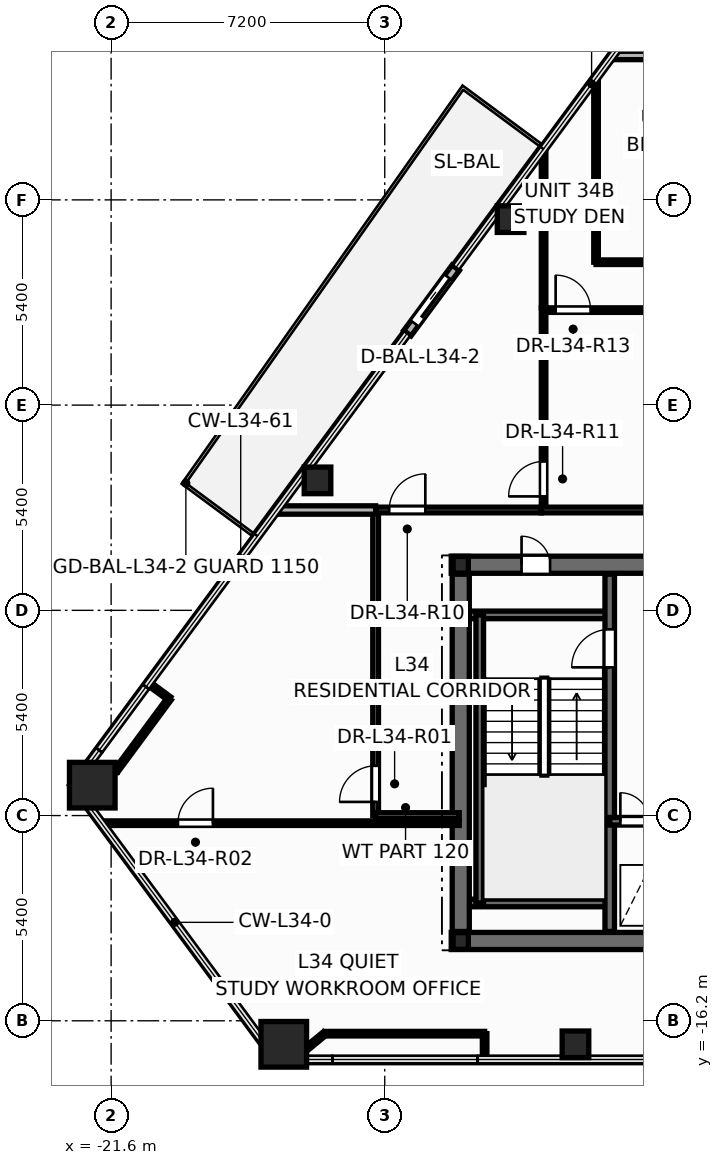
"""IFC4 building model, lengths in metres.
Left out: names, types, materials, properties, quantities, classifications, styles, units other than length and angle.
Written with IfcOpenShell. Run it as: python <this file> out.ifc"""

import sys

from ifc_helpers import new_model, si_unit, direction, frame, frame_2d, origin, origin_2d, place, context, subcontext, project, spatial, rectangle, hollow_rectangle, hollow_circle, i_section, extrude, element, fill, save


model = new_model("IFC4")
c1 = context("Model", 3, precision=1e-05, world=origin(), true_north=direction((0.0, 1.0)))
c2 = subcontext(c1, "Body", "Model", "MODEL_VIEW")
j1 = project(units=[si_unit("LENGTHUNIT", "METRE"), si_unit("PLANEANGLEUNIT", "RADIAN")], contexts=[c1])
p1 = place(None, origin())
s1 = spatial("IfcSite", under=j1, at=p1, CompositionType="ELEMENT")
p2 = place(p1, origin())
s2 = spatial("IfcBuilding", under=s1, at=p2, CompositionType="ELEMENT")
p3 = place(p2, frame((0.0, 0.0, 132.9)))
s3 = spatial("IfcBuildingStorey", under=s2, at=p3, CompositionType="ELEMENT", Elevation=132.9)
for number, where, z_axis, x_axis in (
    (1, (-22.096, -10.0, 0.0), (0.0, 0.0, 1.0), (1.0, 0.0, 0.0)),
    (2, (-17.057, -16.819, 0.0), (0.0, 0.0, 1.0), (1.0, 0.0, 0.0)),
):
    element("IfcColumn", number, at=place(p3, frame(where, z_axis=z_axis, x_axis=x_axis)), inside=s3, PredefinedType="COLUMN", context=c2, shape_type="SweptSolid", body=[
        extrude(hollow_rectangle(XDim=1.2, YDim=1.2, WallThickness=0.055, at=origin_2d()), origin(), (0.0, 0.0, 1.0), 3.6),
    ])
for number, where, z_axis, x_axis in (
    (3, (-9.381, -16.819, 0.0), (0.0, 0.0, 1.0), (1.0, 0.0, 0.0)),
    (4, (-11.089, 4.894, 0.0), (0.0, 0.0, 1.0), (1.0, 0.0, 0.0)),
    (5, (-16.169, -1.98, 0.0), (0.0, 0.0, 1.0), (1.0, 0.0, 0.0)),
):
    element("IfcColumn", number, at=place(p3, frame(where, z_axis=z_axis, x_axis=x_axis)), inside=s3, PredefinedType="COLUMN", context=c2, shape_type="SweptSolid", body=[
        extrude(hollow_circle(Radius=0.35, WallThickness=0.03, at=origin_2d()), origin(), (0.0, 0.0, 1.0), 3.6),
    ])
for number, where, z_axis, x_axis in (
    (6, (-12.4, -14.1, 0.0), (0.0, 0.0, 1.0), (1.0, 0.0, 0.0)),
    (7, (-12.4, -4.2, 0.0), (0.0, 0.0, 1.0), (1.0, 0.0, 0.0)),
):
    element("IfcColumn", number, at=place(p3, frame(where, z_axis=z_axis, x_axis=x_axis)), inside=s3, PredefinedType="COLUMN", context=c2, shape_type="SweptSolid", body=[
        extrude(i_section(OverallWidth=0.4, OverallDepth=0.44, WebThickness=0.028, FlangeThickness=0.04, at=origin_2d()), origin(), (0.0, 0.0, 1.0), 3.6),
    ])
p4 = place(p3, frame((-12.532, 3.614, -0.015), z_axis=(0.0, 0.0, 1.0), x_axis=(-0.594381437757, -0.804183254271, 0.0)))
e8 = element("IfcWall", 8, at=p4, inside=s3, PredefinedType="STANDARD", context=c2, shape_type="SweptSolid", body=[
    extrude(rectangle(XDim=2.14, YDim=0.24, at=frame_2d((1.07, 0.0))), origin(), (0.0, 0.0, 1.0), 2.807),
])
p5 = place(p4, frame((0.32, 0.0, 0.015)))
e9 = element("IfcOpeningElement", 9, at=p5, cuts=e8, PredefinedType="OPENING", context=c2, shape_type="SweptSolid", body=[
    extrude(rectangle(XDim=1.506, YDim=2.204, at=frame_2d((0.75, 1.102))), frame((0.0, 0.13, 0.0), z_axis=(0.0, -1.0, 0.0), x_axis=(1.0, 0.0, 0.0)), (0.0, 0.0, 1.0), 0.26),
])
p6 = place(p3, frame((-12.65, -14.1, 0.0), z_axis=(0.0, 0.0, 1.0), x_axis=(1.0, 0.0, 0.0)))
e10 = element("IfcWall", 10, at=p6, inside=s3, PredefinedType="SHEAR", context=c2, shape_type="SweptSolid", body=[
    extrude(rectangle(XDim=25.3, YDim=0.45, at=frame_2d((12.65, 0.0))), origin(), (0.0, 0.0, 1.0), 3.6),
])
p7 = place(p3, frame((-12.65, -4.2, 0.0), z_axis=(0.0, 0.0, 1.0), x_axis=(1.0, 0.0, 0.0)))
e11 = element("IfcWall", 11, at=p7, inside=s3, PredefinedType="SHEAR", context=c2, shape_type="SweptSolid", body=[
    extrude(rectangle(XDim=25.3, YDim=0.45, at=frame_2d((12.65, 0.0))), origin(), (0.0, 0.0, 1.0), 3.6),
])
p8 = place(p7, frame((1.85, 0.0, 0.0)))
e12 = element("IfcOpeningElement", 12, at=p8, cuts=e11, PredefinedType="OPENING", context=c2, shape_type="SweptSolid", body=[
    extrude(rectangle(XDim=0.756, YDim=2.054, at=frame_2d((0.375, 1.027))), frame((0.0, 0.235, 0.0), z_axis=(0.0, -1.0, 0.0), x_axis=(1.0, 0.0, 0.0)), (0.0, 0.0, 1.0), 0.47),
])
p9 = place(p7, frame((21.85, 0.0, 0.0)))
e13 = element("IfcOpeningElement", 13, at=p9, cuts=e11, PredefinedType="OPENING", context=c2, shape_type="SweptSolid", body=[
    extrude(rectangle(XDim=0.756, YDim=2.054, at=frame_2d((0.375, 1.027))), frame((0.0, 0.235, 0.0), z_axis=(0.0, -1.0, 0.0), x_axis=(1.0, 0.0, 0.0)), (0.0, 0.0, 1.0), 0.47),
])
p10 = place(p7, frame((23.5, 0.0, 0.0)))
e14 = element("IfcOpeningElement", 14, at=p10, cuts=e11, PredefinedType="OPENING", context=c2, shape_type="SweptSolid", body=[
    extrude(rectangle(XDim=0.756, YDim=2.054, at=frame_2d((0.375, 1.027))), frame((0.0, 0.235, 0.0), z_axis=(0.0, -1.0, 0.0), x_axis=(1.0, 0.0, 0.0)), (0.0, 0.0, 1.0), 0.47),
])
p11 = place(p7, frame((5.85, 0.0, 0.0)))
e15 = element("IfcOpeningElement", 15, at=p11, cuts=e11, PredefinedType="OPENING", context=c2, shape_type="SweptSolid", body=[
    extrude(rectangle(XDim=1.006, YDim=2.104, at=frame_2d((0.5, 1.052))), frame((0.0, 0.235, 0.0), z_axis=(0.0, -1.0, 0.0), x_axis=(1.0, 0.0, 0.0)), (0.0, 0.0, 1.0), 0.47),
])
p12 = place(p7, frame((10.35, 0.0, 0.0)))
e16 = element("IfcOpeningElement", 16, at=p12, cuts=e11, PredefinedType="OPENING", context=c2, shape_type="SweptSolid", body=[
    extrude(rectangle(XDim=1.406, YDim=2.154, at=frame_2d((0.7, 1.077))), frame((0.0, 0.235, 0.0), z_axis=(0.0, -1.0, 0.0), x_axis=(1.0, 0.0, 0.0)), (0.0, 0.0, 1.0), 0.47),
])
p13 = place(p7, frame((18.45, 0.0, 0.0)))
e17 = element("IfcOpeningElement", 17, at=p13, cuts=e11, PredefinedType="OPENING", context=c2, shape_type="SweptSolid", body=[
    extrude(rectangle(XDim=1.006, YDim=2.104, at=frame_2d((0.5, 1.052))), frame((0.0, 0.235, 0.0), z_axis=(0.0, -1.0, 0.0), x_axis=(1.0, 0.0, 0.0)), (0.0, 0.0, 1.0), 0.47),
])
for number, where, z_axis, x_axis in (
    (18, (-12.35, -5.52, 0.0), (0.0, 0.0, 1.0), (1.0, 0.0, 0.0)),
    (19, (-12.35, -13.1, 0.0), (0.0, 0.0, 1.0), (1.0, 0.0, 0.0)),
):
    element("IfcWall", number, at=place(p3, frame(where, z_axis=z_axis, x_axis=x_axis)), inside=s3, PredefinedType="SOLIDWALL", context=c2, shape_type="SweptSolid", body=[
        extrude(rectangle(XDim=3.87, YDim=0.2, at=frame_2d((1.935, 0.0))), origin(), (0.0, 0.0, 1.0), 3.6),
    ])
p14 = place(p3, frame((-11.9, -13.1, 0.0), z_axis=(0.0, 0.0, 1.0), x_axis=(0.0, 1.0, 0.0)))
e20 = element("IfcWall", 20, at=p14, inside=s3, PredefinedType="SOLIDWALL", context=c2, shape_type="SweptSolid", body=[
    extrude(rectangle(XDim=7.58, YDim=0.2, at=frame_2d((3.79, 0.0))), origin(), (0.0, 0.0, 1.0), 3.6),
])
p15 = place(p3, frame((-8.48, -13.85, 0.0), z_axis=(0.0, 0.0, 1.0), x_axis=(0.0, 1.0, 0.0)))
e21 = element("IfcWall", 21, at=p15, inside=s3, PredefinedType="SHEAR", context=c2, shape_type="SweptSolid", body=[
    extrude(rectangle(XDim=9.4, YDim=0.25, at=frame_2d((4.7, 0.0))), origin(), (0.0, 0.0, 1.0), 3.6),
])
p16 = place(p15, frame((6.95, 0.0, 0.0)))
e22 = element("IfcOpeningElement", 22, at=p16, cuts=e21, PredefinedType="OPENING", context=c2, shape_type="SweptSolid", body=[
    extrude(rectangle(XDim=1.006, YDim=2.104, at=frame_2d((0.5, 1.052))), frame((0.0, 0.135, 0.0), z_axis=(0.0, -1.0, 0.0), x_axis=(1.0, 0.0, 0.0)), (0.0, 0.0, 1.0), 0.27),
])
p17 = place(p3, frame((-8.48, -10.95, 0.0), z_axis=(0.0, 0.0, 1.0), x_axis=(1.0, 0.0, 0.0)))
e23 = element("IfcWall", 23, at=p17, inside=s3, PredefinedType="SOLIDWALL", context=c2, shape_type="SweptSolid", body=[
    extrude(rectangle(XDim=3.36, YDim=0.2, at=frame_2d((1.68, 0.0))), origin(), (0.0, 0.0, 1.0), 3.6),
])
p18 = place(p17, frame((0.28, 0.0, 0.0)))
e24 = element("IfcOpeningElement", 24, at=p18, cuts=e23, PredefinedType="OPENING", context=c2, shape_type="SweptSolid", body=[
    extrude(rectangle(XDim=0.756, YDim=2.054, at=frame_2d((0.375, 1.027))), frame((0.0, 0.11, 0.0), z_axis=(0.0, -1.0, 0.0), x_axis=(1.0, 0.0, 0.0)), (0.0, 0.0, 1.0), 0.22),
])
p19 = place(p17, frame((1.85, 0.0, 0.0)))
e25 = element("IfcOpeningElement", 25, at=p19, cuts=e23, PredefinedType="OPENING", context=c2, shape_type="SweptSolid", body=[
    extrude(rectangle(XDim=1.106, YDim=2.104, at=frame_2d((0.55, 1.052))), frame((0.0, 0.11, 0.0), z_axis=(0.0, -1.0, 0.0), x_axis=(1.0, 0.0, 0.0)), (0.0, 0.0, 1.0), 0.22),
])
p20 = place(p3, frame((-12.4, -13.85, 0.0), z_axis=(0.0, 0.0, 1.0), x_axis=(0.0, 1.0, 0.0)))
e26 = element("IfcWall", 26, at=p20, inside=s3, PredefinedType="SHEAR", context=c2, shape_type="SweptSolid", body=[
    extrude(rectangle(XDim=9.4, YDim=0.45, at=frame_2d((4.7, 0.0))), origin(), (0.0, 0.0, 1.0), 3.6),
])
p21 = place(p3, frame((-21.855, -11.0, 0.0), z_axis=(0.0, 0.0, 1.0), x_axis=(1.0, 0.0, 0.0)))
e27 = element("IfcWall", 27, at=p21, inside=s3, PredefinedType="PARTITIONING", context=c2, shape_type="SweptSolid", body=[
    extrude(rectangle(XDim=9.415, YDim=0.12, at=frame_2d((4.708, 0.0))), origin(), (0.0, 0.0, 1.0), 2.792),
])
p22 = place(p21, frame((2.014, 0.0, 0.0)))
e28 = element("IfcOpeningElement", 28, at=p22, cuts=e27, PredefinedType="OPENING", context=c2, shape_type="SweptSolid", body=[
    extrude(rectangle(XDim=0.926, YDim=2.104, at=frame_2d((0.46, 1.052))), frame((0.0, 0.07, 0.0), z_axis=(0.0, -1.0, 0.0), x_axis=(1.0, 0.0, 0.0)), (0.0, 0.0, 1.0), 0.14),
])
p23 = place(p3, frame((-14.64, -10.8, 0.0), z_axis=(0.0, 0.0, 1.0), x_axis=(0.0, 1.0, 0.0)))
e29 = element("IfcWall", 29, at=p23, inside=s3, PredefinedType="PARTITIONING", context=c2, shape_type="SweptSolid", body=[
    extrude(rectangle(XDim=8.04, YDim=0.15, at=frame_2d((4.02, 0.0))), origin(), (0.0, 0.0, 1.0), 2.325),
])
p24 = place(p23, frame((0.359, 0.0, 0.0)))
e30 = element("IfcOpeningElement", 30, at=p24, cuts=e29, PredefinedType="OPENING", context=c2, shape_type="SweptSolid", body=[
    extrude(rectangle(XDim=0.956, YDim=2.104, at=frame_2d((0.475, 1.052))), frame((0.0, 0.085, 0.0), z_axis=(0.0, -1.0, 0.0), x_axis=(1.0, 0.0, 0.0)), (0.0, 0.0, 1.0), 0.17),
])
p25 = place(p3, frame((-10.22, -2.76, 0.0), z_axis=(0.0, 0.0, 1.0), x_axis=(0.0, 1.0, 0.0)))
e31 = element("IfcWall", 31, at=p25, inside=s3, PredefinedType="PARTITIONING", context=c2, shape_type="SweptSolid", body=[
    extrude(rectangle(XDim=5.32, YDim=0.12, at=frame_2d((2.66, 0.0))), origin(), (0.0, 0.0, 1.0), 2.617),
])
p26 = place(p25, frame((0.358, 0.0, 0.0)))
e32 = element("IfcOpeningElement", 32, at=p26, cuts=e31, PredefinedType="OPENING", context=c2, shape_type="SweptSolid", body=[
    extrude(rectangle(XDim=0.926, YDim=2.104, at=frame_2d((0.46, 1.052))), frame((0.0, 0.07, 0.0), z_axis=(0.0, -1.0, 0.0), x_axis=(1.0, 0.0, 0.0)), (0.0, 0.0, 1.0), 0.14),
])
p27 = place(p3, frame((-8.84, 3.76, 0.0), z_axis=(0.0, 0.0, 1.0), x_axis=(0.0, 1.0, 0.0)))
e33 = element("IfcWall", 33, at=p27, inside=s3, PredefinedType="PARTITIONING", context=c2, shape_type="SweptSolid", body=[
    extrude(rectangle(XDim=4.849, YDim=0.12, at=frame_2d((2.425, 0.0))), origin(), (0.0, 0.0, 1.0), 2.617),
])
p28 = place(p3, frame((-8.84, 3.76, 0.0), z_axis=(0.0, 0.0, 1.0), x_axis=(1.0, 0.0, 0.0)))
e34 = element("IfcWall", 34, at=p28, inside=s3, PredefinedType="PARTITIONING", context=c2, shape_type="SweptSolid", body=[
    extrude(rectangle(XDim=6.88, YDim=0.12, at=frame_2d((3.44, 0.0))), origin(), (0.0, 0.0, 1.0), 2.617),
])
p29 = place(p3, frame((-8.404, 9.2, 0.0), z_axis=(0.0, 0.0, 1.0), x_axis=(1.0, 0.0, 0.0)))
e35 = element("IfcWall", 35, at=p29, inside=s3, PredefinedType="PARTITIONING", context=c2, shape_type="SweptSolid", body=[
    extrude(rectangle(XDim=9.043, YDim=0.22, at=frame_2d((4.522, 0.0))), origin(), (0.0, 0.0, 1.0), 2.617),
])
p30 = place(p3, frame((-10.28, -2.76, 0.0), z_axis=(0.0, 0.0, 1.0), x_axis=(1.0, 0.0, 0.0)))
e36 = element("IfcWall", 36, at=p30, inside=s3, PredefinedType="PARTITIONING", context=c2, shape_type="SweptSolid", body=[
    extrude(rectangle(XDim=10.92, YDim=0.15, at=frame_2d((5.46, 0.0))), origin(), (0.0, 0.0, 1.0), 2.325),
])
p31 = place(p3, frame((-14.64, -2.76, 0.0), z_axis=(0.0, 0.0, 1.0), x_axis=(1.0, 0.0, 0.0)))
e37 = element("IfcWall", 37, at=p31, inside=s3, PredefinedType="PARTITIONING", context=c2, shape_type="SweptSolid", body=[
    extrude(rectangle(XDim=4.358, YDim=0.15, at=frame_2d((2.179, 0.0))), origin(), (0.0, 0.0, 1.0), 3.35),
])
p32 = place(p31, frame((0.358, 0.0, 0.0)))
e38 = element("IfcOpeningElement", 38, at=p32, cuts=e37, PredefinedType="OPENING", context=c2, shape_type="SweptSolid", body=[
    extrude(rectangle(XDim=0.956, YDim=2.104, at=frame_2d((0.475, 1.052))), frame((0.0, 0.085, 0.0), z_axis=(0.0, -1.0, 0.0), x_axis=(1.0, 0.0, 0.0)), (0.0, 0.0, 1.0), 0.17),
])
p33 = place(p3, frame((-10.22, 2.562, 0.0), z_axis=(0.0, 0.0, 1.0), x_axis=(0.0, 1.0, 0.0)))
e39 = element("IfcWall", 39, at=p33, inside=s3, PredefinedType="PARTITIONING", context=c2, shape_type="SweptSolid", body=[
    extrude(rectangle(XDim=4.18, YDim=0.12, at=frame_2d((2.09, 0.0))), origin(), (0.0, 0.0, 1.0), 2.617),
])
p34 = place(p3, frame((-15.982, -16.539, 0.0), z_axis=(0.0, 0.0, 1.0), x_axis=(1.0, 0.0, 0.0)))
e40 = element("IfcWall", 40, at=p34, inside=s3, PredefinedType="PARTITIONING", context=c2, shape_type="SweptSolid", body=[
    extrude(rectangle(XDim=4.211, YDim=0.12, at=frame_2d((2.105, 0.0))), origin(), (0.0, 0.0, 1.0), 3.35),
])
p35 = place(p3, frame((-10.22, 2.5, 0.0), z_axis=(0.0, 0.0, 1.0), x_axis=(1.0, 0.0, 0.0)))
e41 = element("IfcWall", 41, at=p35, inside=s3, PredefinedType="PARTITIONING", context=c2, shape_type="SweptSolid", body=[
    extrude(rectangle(XDim=3.8, YDim=0.12, at=frame_2d((1.9, 0.0))), origin(), (0.0, 0.0, 1.0), 2.325),
])
p36 = place(p35, frame((0.317, 0.0, 0.0)))
e42 = element("IfcOpeningElement", 42, at=p36, cuts=e41, PredefinedType="OPENING", context=c2, shape_type="SweptSolid", body=[
    extrude(rectangle(XDim=0.926, YDim=2.104, at=frame_2d((0.46, 1.052))), frame((0.0, 0.07, 0.0), z_axis=(0.0, -1.0, 0.0), x_axis=(1.0, 0.0, 0.0)), (0.0, 0.0, 1.0), 0.14),
])
p37 = place(p3, frame((-17.243, -2.76, 0.0), z_axis=(0.0, 0.0, 1.0), x_axis=(1.0, 0.0, 0.0)))
e43 = element("IfcWall", 43, at=p37, inside=s3, PredefinedType="PARTITIONING", context=c2, shape_type="SweptSolid", body=[
    extrude(rectangle(XDim=2.603, YDim=0.22, at=frame_2d((1.301, 0.0))), origin(), (0.0, 0.0, 1.0), 2.792),
])
p38 = place(p3, frame((-20.066, -7.725, 0.0), z_axis=(0.0, 0.0, 1.0), x_axis=(-0.594385220585, -0.804180458324, 0.0)))
e44 = element("IfcWall", 44, at=p38, inside=s3, PredefinedType="PARTITIONING", context=c2, shape_type="SweptSolid", body=[
    extrude(rectangle(XDim=2.351, YDim=0.12, at=frame_2d((1.175, 0.0))), origin(), (0.0, 0.0, 1.0), 2.325),
])
p39 = place(p3, frame((-14.64, -10.8, 0.0), z_axis=(0.0, 0.0, 1.0), x_axis=(1.0, 0.0, 0.0)))
e45 = element("IfcWall", 45, at=p39, inside=s3, PredefinedType="PARTITIONING", context=c2, shape_type="SweptSolid", body=[
    extrude(rectangle(XDim=2.2, YDim=0.15, at=frame_2d((1.1, 0.0))), origin(), (0.0, 0.0, 1.0), 2.792),
])
p40 = place(p3, frame((-16.641, -17.08, 0.0), z_axis=(0.0, 0.0, 1.0), x_axis=(0.77301214671, 0.634391220809, 0.0)))
e46 = element("IfcWall", 46, at=p40, inside=s3, PredefinedType="PARTITIONING", context=c2, shape_type="SweptSolid", body=[
    extrude(rectangle(XDim=0.853, YDim=0.12, at=frame_2d((0.426, 0.0))), origin(), (0.0, 0.0, 1.0), 2.792),
])
p41 = place(p3, frame((-21.464, -9.615, 0.0), z_axis=(0.0, 0.0, 1.0), x_axis=(-0.982663626831, -0.185397401557, 0.0)))
e47 = element("IfcWall", 47, at=p41, inside=s3, PredefinedType="PARTITIONING", context=c2, shape_type="SweptSolid", body=[
    extrude(rectangle(XDim=0.851, YDim=0.12, at=frame_2d((0.425, 0.0))), origin(), (0.0, 0.0, 1.0), 2.325),
])
for number, where, z_axis, x_axis in (
    (48, (-20.605, -7.326, 0.0), (0.0, 0.0, 1.0), (0.804, -0.595, 0.0)),
    (49, (-11.771, -16.539, 0.0), (0.0, 0.0, 1.0), (0.0, -1.0, 0.0)),
):
    element("IfcWall", number, at=place(p3, frame(where, z_axis=z_axis, x_axis=x_axis)), inside=s3, PredefinedType="PARTITIONING", context=c2, shape_type="SweptSolid", body=[
        extrude(rectangle(XDim=0.67, YDim=0.12, at=frame_2d((0.335, 0.0))), origin(), (0.0, 0.0, 1.0), 2.792),
    ])
p42 = place(p5, origin())
e50 = element("IfcDoor", 50, at=p42, inside=s3, OperationType="SLIDING_TO_RIGHT", PredefinedType="DOOR", context=c2, shape_type="SweptSolid", body=[
    extrude(rectangle(XDim=1.5, YDim=2.2, at=frame_2d((0.75, 1.1))), frame((0.0, 0.025, 0.0), z_axis=(0.0, -1.0, 0.0), x_axis=(1.0, 0.0, 0.0)), (0.0, 0.0, 1.0), 0.05),
])
fill(e9, e50)
p43 = place(p16, origin())
e51 = element("IfcDoor", 51, at=p43, inside=s3, OperationType="SINGLE_SWING_LEFT", PredefinedType="DOOR", context=c2, shape_type="SweptSolid", body=[
    extrude(rectangle(XDim=1.0, YDim=2.1, at=frame_2d((0.5, 1.05))), frame((0.0, 0.025, 0.0), z_axis=(0.0, -1.0, 0.0), x_axis=(1.0, 0.0, 0.0)), (0.0, 0.0, 1.0), 0.05),
])
fill(e22, e51)
p44 = place(p18, origin())
e52 = element("IfcDoor", 52, at=p44, inside=s3, OperationType="SINGLE_SWING_LEFT", PredefinedType="DOOR", context=c2, shape_type="SweptSolid", body=[
    extrude(rectangle(XDim=0.75, YDim=2.05, at=frame_2d((0.375, 1.025))), frame((0.0, 0.025, 0.0), z_axis=(0.0, -1.0, 0.0), x_axis=(1.0, 0.0, 0.0)), (0.0, 0.0, 1.0), 0.05),
])
fill(e24, e52)
p45 = place(p8, origin())
e53 = element("IfcDoor", 53, at=p45, inside=s3, OperationType="SINGLE_SWING_LEFT", PredefinedType="DOOR", context=c2, shape_type="SweptSolid", body=[
    extrude(rectangle(XDim=0.75, YDim=2.05, at=frame_2d((0.375, 1.025))), frame((0.0, 0.025, 0.0), z_axis=(0.0, -1.0, 0.0), x_axis=(1.0, 0.0, 0.0)), (0.0, 0.0, 1.0), 0.05),
])
fill(e12, e53)
p46 = place(p24, origin())
e54 = element("IfcDoor", 54, at=p46, inside=s3, OperationType="SINGLE_SWING_LEFT", PredefinedType="DOOR", context=c2, shape_type="SweptSolid", body=[
    extrude(rectangle(XDim=0.95, YDim=2.1, at=frame_2d((0.475, 1.05))), frame((0.0, 0.025, 0.0), z_axis=(0.0, -1.0, 0.0), x_axis=(1.0, 0.0, 0.0)), (0.0, 0.0, 1.0), 0.05),
])
fill(e30, e54)
p47 = place(p22, origin())
e55 = element("IfcDoor", 55, at=p47, inside=s3, OperationType="SINGLE_SWING_RIGHT", PredefinedType="DOOR", context=c2, shape_type="SweptSolid", body=[
    extrude(rectangle(XDim=0.92, YDim=2.1, at=frame_2d((0.46, 1.05))), frame((0.0, 0.025, 0.0), z_axis=(0.0, -1.0, 0.0), x_axis=(1.0, 0.0, 0.0)), (0.0, 0.0, 1.0), 0.05),
])
fill(e28, e55)
p48 = place(p32, origin())
e56 = element("IfcDoor", 56, at=p48, inside=s3, OperationType="SINGLE_SWING_RIGHT", PredefinedType="DOOR", context=c2, shape_type="SweptSolid", body=[
    extrude(rectangle(XDim=0.95, YDim=2.1, at=frame_2d((0.475, 1.05))), frame((0.0, 0.025, 0.0), z_axis=(0.0, -1.0, 0.0), x_axis=(1.0, 0.0, 0.0)), (0.0, 0.0, 1.0), 0.05),
])
fill(e38, e56)
p49 = place(p26, origin())
e57 = element("IfcDoor", 57, at=p49, inside=s3, OperationType="SINGLE_SWING_LEFT", PredefinedType="DOOR", context=c2, shape_type="SweptSolid", body=[
    extrude(rectangle(XDim=0.92, YDim=2.1, at=frame_2d((0.46, 1.05))), frame((0.0, 0.025, 0.0), z_axis=(0.0, -1.0, 0.0), x_axis=(1.0, 0.0, 0.0)), (0.0, 0.0, 1.0), 0.05),
])
fill(e32, e57)
p50 = place(p36, origin())
e58 = element("IfcDoor", 58, at=p50, inside=s3, OperationType="SINGLE_SWING_LEFT", PredefinedType="DOOR", context=c2, shape_type="SweptSolid", body=[
    extrude(rectangle(XDim=0.92, YDim=2.1, at=frame_2d((0.46, 1.05))), frame((0.0, 0.025, 0.0), z_axis=(0.0, -1.0, 0.0), x_axis=(1.0, 0.0, 0.0)), (0.0, 0.0, 1.0), 0.05),
])
fill(e42, e58)
save(model, sys.argv[1])
